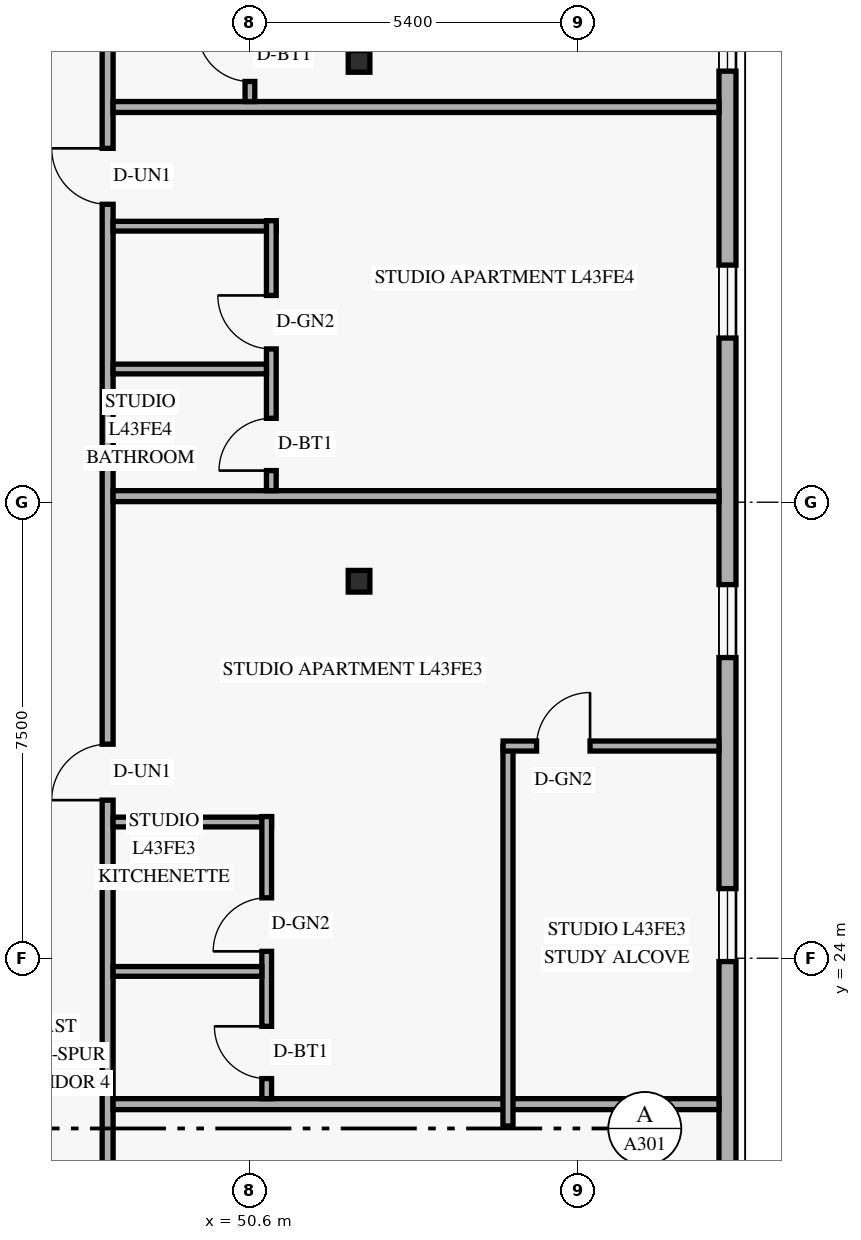
"""IFC4 building model, lengths in metres.
Left out: names, types, materials, properties, quantities, classifications, styles, units other than length and angle.
Written with IfcOpenShell. Run it as: python <this file> out.ifc"""

import sys

from ifc_helpers import new_model, si_unit, direction, frame, frame_2d, origin, origin_2d, place, context, subcontext, project, spatial, rectangle, hollow_rectangle, extrude, element, fill, save


model = new_model("IFC4")
c1 = context("Model", 3, precision=1e-05, world=origin(), true_north=direction((0.0, 1.0)))
c2 = subcontext(c1, "Body", "Model", "MODEL_VIEW")
j1 = project(units=[si_unit("LENGTHUNIT", "METRE"), si_unit("PLANEANGLEUNIT", "RADIAN")], contexts=[c1])
p1 = place(None, origin())
s1 = spatial("IfcSite", under=j1, at=p1, CompositionType="ELEMENT")
p2 = place(p1, origin())
s2 = spatial("IfcBuilding", under=s1, at=p2, CompositionType="ELEMENT")
p3 = place(p2, frame((0.0, 0.0, 166.2)))
s3 = spatial("IfcBuildingStorey", under=s2, at=p3, CompositionType="ELEMENT", Elevation=166.2)
for number, where, z_axis, x_axis in (
    (1, (52.296, 30.2, 0.0), (0.058, 0.0, 0.998), (0.0, 1.0, 0.0)),
    (2, (52.296, 38.75, 0.0), (0.058, 0.0, 0.998), (0.0, 1.0, 0.0)),
):
    element("IfcColumn", number, at=place(p3, frame(where, z_axis=z_axis, x_axis=x_axis)), inside=s3, PredefinedType="COLUMN", context=c2, shape_type="SweptSolid", body=[
        extrude(hollow_rectangle(XDim=0.356, YDim=0.356, WallThickness=0.016, at=origin_2d()), origin(), (0.0, 0.0, 1.0), 3.606),
    ])
p4 = place(p3, frame((58.46, 7.62, 0.0), z_axis=(0.0, 0.0, 1.0), x_axis=(0.0, 1.0, 0.0)))
e3 = element("IfcWall", 3, at=p4, inside=s3, PredefinedType="SOLIDWALL", context=c2, shape_type="SweptSolid", body=[
    extrude(rectangle(XDim=32.76, YDim=0.28, at=frame_2d((16.38, 0.0))), origin(), (0.0, 0.0, 1.0), 3.36),
])
p5 = place(p4, frame((1.79, 0.0, 0.85)))
e4 = element("IfcOpeningElement", 4, at=p5, cuts=e3, PredefinedType="OPENING", context=c2, shape_type="SweptSolid", body=[
    extrude(rectangle(XDim=1.2, YDim=1.5, at=frame_2d((0.6, 0.75))), frame((0.0, 0.15, 0.0), z_axis=(0.0, -1.0, 0.0), x_axis=(1.0, 0.0, 0.0)), (0.0, 0.0, 1.0), 0.3),
])
p6 = place(p4, frame((8.78, 0.0, 0.85)))
e5 = element("IfcOpeningElement", 5, at=p6, cuts=e3, PredefinedType="OPENING", context=c2, shape_type="SweptSolid", body=[
    extrude(rectangle(XDim=1.2, YDim=1.5, at=frame_2d((0.6, 0.75))), frame((0.0, 0.15, 0.0), z_axis=(0.0, -1.0, 0.0), x_axis=(1.0, 0.0, 0.0)), (0.0, 0.0, 1.0), 0.3),
])
p7 = place(p4, frame((16.325, 0.0, 0.85)))
e6 = element("IfcOpeningElement", 6, at=p7, cuts=e3, PredefinedType="OPENING", context=c2, shape_type="SweptSolid", body=[
    extrude(rectangle(XDim=1.2, YDim=1.5, at=frame_2d((0.6, 0.75))), frame((0.0, 0.15, 0.0), z_axis=(0.0, -1.0, 0.0), x_axis=(1.0, 0.0, 0.0)), (0.0, 0.0, 1.0), 0.3),
])
p8 = place(p4, frame((21.325, 0.0, 0.85)))
e7 = element("IfcOpeningElement", 7, at=p8, cuts=e3, PredefinedType="OPENING", context=c2, shape_type="SweptSolid", body=[
    extrude(rectangle(XDim=1.2, YDim=1.5, at=frame_2d((0.6, 0.75))), frame((0.0, 0.15, 0.0), z_axis=(0.0, -1.0, 0.0), x_axis=(1.0, 0.0, 0.0)), (0.0, 0.0, 1.0), 0.3),
])
p9 = place(p4, frame((26.58, 0.0, 0.85)))
e8 = element("IfcOpeningElement", 8, at=p9, cuts=e3, PredefinedType="OPENING", context=c2, shape_type="SweptSolid", body=[
    extrude(rectangle(XDim=1.2, YDim=1.5, at=frame_2d((0.6, 0.75))), frame((0.0, 0.15, 0.0), z_axis=(0.0, -1.0, 0.0), x_axis=(1.0, 0.0, 0.0)), (0.0, 0.0, 1.0), 0.3),
])
p10 = place(p4, frame((30.97, 0.0, 0.85)))
e9 = element("IfcOpeningElement", 9, at=p10, cuts=e3, PredefinedType="OPENING", context=c2, shape_type="SweptSolid", body=[
    extrude(rectangle(XDim=1.2, YDim=1.5, at=frame_2d((0.6, 0.75))), frame((0.0, 0.15, 0.0), z_axis=(0.0, -1.0, 0.0), x_axis=(1.0, 0.0, 0.0)), (0.0, 0.0, 1.0), 0.3),
])
p11 = place(p3, frame((48.266, 4.28, 0.0), z_axis=(0.0, 0.0, 1.0), x_axis=(0.0, 1.0, 0.0)))
e10 = element("IfcWall", 10, at=p11, inside=s3, PredefinedType="STANDARD", context=c2, shape_type="SweptSolid", body=[
    extrude(rectangle(XDim=39.44, YDim=0.18, at=frame_2d((19.72, 0.0))), origin(), (0.0, 0.0, 1.0), 2.73),
])
p12 = place(p11, frame((2.18, 0.0, 0.0)))
e11 = element("IfcOpeningElement", 11, at=p12, cuts=e10, PredefinedType="OPENING", context=c2, shape_type="SweptSolid", body=[
    extrude(rectangle(XDim=0.92, YDim=2.15, at=frame_2d((0.46, 1.075))), frame((0.0, 0.1, 0.0), z_axis=(0.0, -1.0, 0.0), x_axis=(1.0, 0.0, 0.0)), (0.0, 0.0, 1.0), 0.2),
])
p13 = place(p11, frame((13.02, 0.0, 0.0)))
e12 = element("IfcOpeningElement", 12, at=p13, cuts=e10, PredefinedType="OPENING", context=c2, shape_type="SweptSolid", body=[
    extrude(rectangle(XDim=0.92, YDim=2.15, at=frame_2d((0.46, 1.075))), frame((0.0, 0.1, 0.0), z_axis=(0.0, -1.0, 0.0), x_axis=(1.0, 0.0, 0.0)), (0.0, 0.0, 1.0), 0.2),
])
p14 = place(p11, frame((22.32, 0.0, 0.0)))
e13 = element("IfcOpeningElement", 13, at=p14, cuts=e10, PredefinedType="OPENING", context=c2, shape_type="SweptSolid", body=[
    extrude(rectangle(XDim=0.92, YDim=2.15, at=frame_2d((0.46, 1.075))), frame((0.0, 0.1, 0.0), z_axis=(0.0, -1.0, 0.0), x_axis=(1.0, 0.0, 0.0)), (0.0, 0.0, 1.0), 0.2),
])
p15 = place(p11, frame((32.12, 0.0, 0.0)))
e14 = element("IfcOpeningElement", 14, at=p15, cuts=e10, PredefinedType="OPENING", context=c2, shape_type="SweptSolid", body=[
    extrude(rectangle(XDim=0.92, YDim=2.15, at=frame_2d((0.46, 1.075))), frame((0.0, 0.1, 0.0), z_axis=(0.0, -1.0, 0.0), x_axis=(1.0, 0.0, 0.0)), (0.0, 0.0, 1.0), 0.2),
])
p16 = place(p11, frame((38.2, 0.0, 0.0)))
e15 = element("IfcOpeningElement", 15, at=p16, cuts=e10, PredefinedType="OPENING", context=c2, shape_type="SweptSolid", body=[
    extrude(rectangle(XDim=0.92, YDim=2.15, at=frame_2d((0.46, 1.075))), frame((0.0, 0.1, 0.0), z_axis=(0.0, -1.0, 0.0), x_axis=(1.0, 0.0, 0.0)), (0.0, 0.0, 1.0), 0.2),
])
p17 = place(p3, frame((48.356, 21.6, 0.0), z_axis=(0.0, 0.0, 1.0), x_axis=(1.0, 0.0, 0.0)))
e16 = element("IfcWall", 16, at=p17, inside=s3, PredefinedType="PARTITIONING", context=c2, shape_type="SweptSolid", body=[
    extrude(rectangle(XDim=9.964, YDim=0.18, at=frame_2d((4.982, 0.0))), origin(), (0.0, 0.0, 1.0), 2.879),
])
p18 = place(p3, frame((48.356, 26.24, 0.0), z_axis=(0.0, 0.0, 1.0), x_axis=(1.0, 0.0, 0.0)))
e17 = element("IfcWall", 17, at=p18, inside=s3, PredefinedType="PLUMBINGWALL", context=c2, shape_type="SweptSolid", body=[
    extrude(rectangle(XDim=2.606, YDim=0.16, at=frame_2d((1.303, 0.0))), origin(), (0.0, 0.0, 1.0), 3.36),
])
p19 = place(p3, frame((50.882, 21.69, 0.0), z_axis=(0.0, 0.0, 1.0), x_axis=(0.0, 1.0, 0.0)))
e18 = element("IfcWall", 18, at=p19, inside=s3, PredefinedType="PLUMBINGWALL", context=c2, shape_type="SweptSolid", body=[
    extrude(rectangle(XDim=4.64, YDim=0.16, at=frame_2d((2.32, 0.0))), origin(), (0.0, 0.0, 1.0), 3.36),
])
p20 = place(p19, frame((0.33, 0.0, 0.0)))
e19 = element("IfcOpeningElement", 19, at=p20, cuts=e18, PredefinedType="OPENING", context=c2, shape_type="SweptSolid", body=[
    extrude(rectangle(XDim=0.86, YDim=2.12, at=frame_2d((0.43, 1.06))), frame((0.0, 0.09, 0.0), z_axis=(0.0, -1.0, 0.0), x_axis=(1.0, 0.0, 0.0)), (0.0, 0.0, 1.0), 0.18),
])
p21 = place(p19, frame((2.423, 0.0, 0.0)))
e20 = element("IfcOpeningElement", 20, at=p21, cuts=e18, PredefinedType="OPENING", context=c2, shape_type="SweptSolid", body=[
    extrude(rectangle(XDim=0.88, YDim=2.12, at=frame_2d((0.44, 1.06))), frame((0.0, 0.09, 0.0), z_axis=(0.0, -1.0, 0.0), x_axis=(1.0, 0.0, 0.0)), (0.0, 0.0, 1.0), 0.18),
])
p22 = place(p3, frame((48.356, 23.783, 0.0), z_axis=(0.0, 0.0, 1.0), x_axis=(1.0, 0.0, 0.0)))
e21 = element("IfcWall", 21, at=p22, inside=s3, PredefinedType="PLUMBINGWALL", context=c2, shape_type="SweptSolid", body=[
    extrude(rectangle(XDim=2.446, YDim=0.16, at=frame_2d((1.223, 0.0))), origin(), (0.0, 0.0, 1.0), 3.36),
])
p23 = place(p3, frame((54.85, 21.24, 0.0), z_axis=(0.0, 0.0, 1.0), x_axis=(0.0, 1.0, 0.0)))
e22 = element("IfcWall", 22, at=p23, inside=s3, PredefinedType="PARTITIONING", context=c2, shape_type="SweptSolid", body=[
    extrude(rectangle(XDim=6.25, YDim=0.165, at=frame_2d((3.125, 0.0))), origin(), (0.0, 0.0, 1.0), 3.36),
])
p24 = place(p3, frame((54.77, 27.49, 0.0), z_axis=(0.0, 0.0, 1.0), x_axis=(1.0, 0.0, 0.0)))
e23 = element("IfcWall", 23, at=p24, inside=s3, PredefinedType="PARTITIONING", context=c2, shape_type="SweptSolid", body=[
    extrude(rectangle(XDim=3.55, YDim=0.165, at=frame_2d((1.775, 0.0))), origin(), (0.0, 0.0, 1.0), 3.36),
])
p25 = place(p24, frame((0.55, 0.0, 0.0)))
e24 = element("IfcOpeningElement", 24, at=p25, cuts=e23, PredefinedType="OPENING", context=c2, shape_type="SweptSolid", body=[
    extrude(rectangle(XDim=0.88, YDim=2.12, at=frame_2d((0.44, 1.06))), frame((0.0, 0.093, 0.0), z_axis=(0.0, -1.0, 0.0), x_axis=(1.0, 0.0, 0.0)), (0.0, 0.0, 1.0), 0.185),
])
p26 = place(p3, frame((48.356, 31.6, 0.0), z_axis=(0.0, 0.0, 1.0), x_axis=(1.0, 0.0, 0.0)))
e25 = element("IfcWall", 25, at=p26, inside=s3, PredefinedType="PARTITIONING", context=c2, shape_type="SweptSolid", body=[
    extrude(rectangle(XDim=9.964, YDim=0.18, at=frame_2d((4.982, 0.0))), origin(), (0.0, 0.0, 1.0), 2.879),
])
p27 = place(p3, frame((48.356, 36.04, 0.0), z_axis=(0.0, 0.0, 1.0), x_axis=(1.0, 0.0, 0.0)))
e26 = element("IfcWall", 26, at=p27, inside=s3, PredefinedType="PLUMBINGWALL", context=c2, shape_type="SweptSolid", body=[
    extrude(rectangle(XDim=2.682, YDim=0.16, at=frame_2d((1.341, 0.0))), origin(), (0.0, 0.0, 1.0), 3.36),
])
p28 = place(p3, frame((50.958, 31.69, 0.0), z_axis=(0.0, 0.0, 1.0), x_axis=(0.0, 1.0, 0.0)))
e27 = element("IfcWall", 27, at=p28, inside=s3, PredefinedType="PLUMBINGWALL", context=c2, shape_type="SweptSolid", body=[
    extrude(rectangle(XDim=4.44, YDim=0.16, at=frame_2d((2.22, 0.0))), origin(), (0.0, 0.0, 1.0), 2.984),
])
p29 = place(p28, frame((0.33, 0.0, 0.0)))
e28 = element("IfcOpeningElement", 28, at=p29, cuts=e27, PredefinedType="OPENING", context=c2, shape_type="SweptSolid", body=[
    extrude(rectangle(XDim=0.86, YDim=2.12, at=frame_2d((0.43, 1.06))), frame((0.0, 0.09, 0.0), z_axis=(0.0, -1.0, 0.0), x_axis=(1.0, 0.0, 0.0)), (0.0, 0.0, 1.0), 0.18),
])
p30 = place(p28, frame((2.331, 0.0, 0.0)))
e29 = element("IfcOpeningElement", 29, at=p30, cuts=e27, PredefinedType="OPENING", context=c2, shape_type="SweptSolid", body=[
    extrude(rectangle(XDim=0.88, YDim=2.12, at=frame_2d((0.44, 1.06))), frame((0.0, 0.09, 0.0), z_axis=(0.0, -1.0, 0.0), x_axis=(1.0, 0.0, 0.0)), (0.0, 0.0, 1.0), 0.18),
])
p31 = place(p3, frame((48.356, 33.691, 0.0), z_axis=(0.0, 0.0, 1.0), x_axis=(1.0, 0.0, 0.0)))
e30 = element("IfcWall", 30, at=p31, inside=s3, PredefinedType="PLUMBINGWALL", context=c2, shape_type="SweptSolid", body=[
    extrude(rectangle(XDim=2.522, YDim=0.16, at=frame_2d((1.261, 0.0))), origin(), (0.0, 0.0, 1.0), 3.36),
])
p32 = place(p3, frame((48.356, 38.0, 0.0), z_axis=(0.0, 0.0, 1.0), x_axis=(1.0, 0.0, 0.0)))
e31 = element("IfcWall", 31, at=p32, inside=s3, PredefinedType="PARTITIONING", context=c2, shape_type="SweptSolid", body=[
    extrude(rectangle(XDim=9.964, YDim=0.18, at=frame_2d((4.982, 0.0))), origin(), (0.0, 0.0, 1.0), 2.879),
])
p33 = place(p3, frame((50.606, 38.09, 0.0), z_axis=(0.0, 0.0, 1.0), x_axis=(0.0, 1.0, 0.0)))
e32 = element("IfcWall", 32, at=p33, inside=s3, PredefinedType="PLUMBINGWALL", context=c2, shape_type="SweptSolid", body=[
    extrude(rectangle(XDim=4.24, YDim=0.16, at=frame_2d((2.12, 0.0))), origin(), (0.0, 0.0, 1.0), 2.73),
])
p34 = place(p33, frame((0.33, 0.0, 0.0)))
e33 = element("IfcOpeningElement", 33, at=p34, cuts=e32, PredefinedType="OPENING", context=c2, shape_type="SweptSolid", body=[
    extrude(rectangle(XDim=0.86, YDim=2.12, at=frame_2d((0.43, 1.06))), frame((0.0, 0.09, 0.0), z_axis=(0.0, -1.0, 0.0), x_axis=(1.0, 0.0, 0.0)), (0.0, 0.0, 1.0), 0.18),
])
p35 = place(p33, frame((2.239, 0.0, 0.0)))
e34 = element("IfcOpeningElement", 34, at=p35, cuts=e32, PredefinedType="OPENING", context=c2, shape_type="SweptSolid", body=[
    extrude(rectangle(XDim=0.88, YDim=2.12, at=frame_2d((0.44, 1.06))), frame((0.0, 0.09, 0.0), z_axis=(0.0, -1.0, 0.0), x_axis=(1.0, 0.0, 0.0)), (0.0, 0.0, 1.0), 0.18),
])
p36 = place(p7, origin())
e35 = element("IfcWindow", 35, at=p36, inside=s3, PartitioningType="SINGLE_PANEL", PredefinedType="WINDOW", context=c2, shape_type="SweptSolid", body=[
    extrude(rectangle(XDim=1.2, YDim=1.5, at=frame_2d((0.6, 0.75))), frame((0.0, 0.03, 0.0), z_axis=(0.0, -1.0, 0.0), x_axis=(1.0, 0.0, 0.0)), (0.0, 0.0, 1.0), 0.06),
])
fill(e6, e35)
p37 = place(p8, origin())
e36 = element("IfcWindow", 36, at=p37, inside=s3, PartitioningType="SINGLE_PANEL", PredefinedType="WINDOW", context=c2, shape_type="SweptSolid", body=[
    extrude(rectangle(XDim=1.2, YDim=1.5, at=frame_2d((0.6, 0.75))), frame((0.0, 0.03, 0.0), z_axis=(0.0, -1.0, 0.0), x_axis=(1.0, 0.0, 0.0)), (0.0, 0.0, 1.0), 0.06),
])
fill(e7, e36)
p38 = place(p9, origin())
e37 = element("IfcWindow", 37, at=p38, inside=s3, PartitioningType="SINGLE_PANEL", PredefinedType="WINDOW", context=c2, shape_type="SweptSolid", body=[
    extrude(rectangle(XDim=1.2, YDim=1.5, at=frame_2d((0.6, 0.75))), frame((0.0, 0.03, 0.0), z_axis=(0.0, -1.0, 0.0), x_axis=(1.0, 0.0, 0.0)), (0.0, 0.0, 1.0), 0.06),
])
fill(e8, e37)
p39 = place(p10, origin())
e38 = element("IfcWindow", 38, at=p39, inside=s3, PartitioningType="SINGLE_PANEL", PredefinedType="WINDOW", context=c2, shape_type="SweptSolid", body=[
    extrude(rectangle(XDim=1.2, YDim=1.5, at=frame_2d((0.6, 0.75))), frame((0.0, 0.03, 0.0), z_axis=(0.0, -1.0, 0.0), x_axis=(1.0, 0.0, 0.0)), (0.0, 0.0, 1.0), 0.06),
])
fill(e9, e38)
p40 = place(p25, origin())
e39 = element("IfcDoor", 39, at=p40, inside=s3, OperationType="SINGLE_SWING_RIGHT", PredefinedType="DOOR", context=c2, shape_type="SweptSolid", body=[
    extrude(rectangle(XDim=0.88, YDim=2.12, at=frame_2d((0.44, 1.06))), frame((0.0, 0.025, 0.0), z_axis=(0.0, -1.0, 0.0), x_axis=(1.0, 0.0, 0.0)), (0.0, 0.0, 1.0), 0.05),
])
fill(e24, e39)
p41 = place(p14, origin())
e40 = element("IfcDoor", 40, at=p41, inside=s3, OperationType="SINGLE_SWING_LEFT", PredefinedType="DOOR", context=c2, shape_type="SweptSolid", body=[
    extrude(rectangle(XDim=0.92, YDim=2.15, at=frame_2d((0.46, 1.075))), frame((0.0, 0.025, 0.0), z_axis=(0.0, -1.0, 0.0), x_axis=(1.0, 0.0, 0.0)), (0.0, 0.0, 1.0), 0.05),
])
fill(e13, e40)
p42 = place(p20, origin())
e41 = element("IfcDoor", 41, at=p42, inside=s3, OperationType="SINGLE_SWING_RIGHT", PredefinedType="DOOR", context=c2, shape_type="SweptSolid", body=[
    extrude(rectangle(XDim=0.86, YDim=2.12, at=frame_2d((0.43, 1.06))), frame((0.0, 0.025, 0.0), z_axis=(0.0, -1.0, 0.0), x_axis=(1.0, 0.0, 0.0)), (0.0, 0.0, 1.0), 0.05),
])
fill(e19, e41)
p43 = place(p21, origin())
e42 = element("IfcDoor", 42, at=p43, inside=s3, OperationType="SINGLE_SWING_LEFT", PredefinedType="DOOR", context=c2, shape_type="SweptSolid", body=[
    extrude(rectangle(XDim=0.88, YDim=2.12, at=frame_2d((0.44, 1.06))), frame((0.0, 0.025, 0.0), z_axis=(0.0, -1.0, 0.0), x_axis=(1.0, 0.0, 0.0)), (0.0, 0.0, 1.0), 0.05),
])
fill(e20, e42)
p44 = place(p15, origin())
e43 = element("IfcDoor", 43, at=p44, inside=s3, OperationType="SINGLE_SWING_RIGHT", PredefinedType="DOOR", context=c2, shape_type="SweptSolid", body=[
    extrude(rectangle(XDim=0.92, YDim=2.15, at=frame_2d((0.46, 1.075))), frame((0.0, 0.025, 0.0), z_axis=(0.0, -1.0, 0.0), x_axis=(1.0, 0.0, 0.0)), (0.0, 0.0, 1.0), 0.05),
])
fill(e14, e43)
p45 = place(p29, origin())
e44 = element("IfcDoor", 44, at=p45, inside=s3, OperationType="SINGLE_SWING_LEFT", PredefinedType="DOOR", context=c2, shape_type="SweptSolid", body=[
    extrude(rectangle(XDim=0.86, YDim=2.12, at=frame_2d((0.43, 1.06))), frame((0.0, 0.025, 0.0), z_axis=(0.0, -1.0, 0.0), x_axis=(1.0, 0.0, 0.0)), (0.0, 0.0, 1.0), 0.05),
])
fill(e28, e44)
p46 = place(p30, origin())
e45 = element("IfcDoor", 45, at=p46, inside=s3, OperationType="SINGLE_SWING_RIGHT", PredefinedType="DOOR", context=c2, shape_type="SweptSolid", body=[
    extrude(rectangle(XDim=0.88, YDim=2.12, at=frame_2d((0.44, 1.06))), frame((0.0, 0.025, 0.0), z_axis=(0.0, -1.0, 0.0), x_axis=(1.0, 0.0, 0.0)), (0.0, 0.0, 1.0), 0.05),
])
fill(e29, e45)
p47 = place(p34, origin())
e46 = element("IfcDoor", 46, at=p47, inside=s3, OperationType="SINGLE_SWING_RIGHT", PredefinedType="DOOR", context=c2, shape_type="SweptSolid", body=[
    extrude(rectangle(XDim=0.86, YDim=2.12, at=frame_2d((0.43, 1.06))), frame((0.0, 0.025, 0.0), z_axis=(0.0, -1.0, 0.0), x_axis=(1.0, 0.0, 0.0)), (0.0, 0.0, 1.0), 0.05),
])
fill(e33, e46)
save(model, sys.argv[1])
